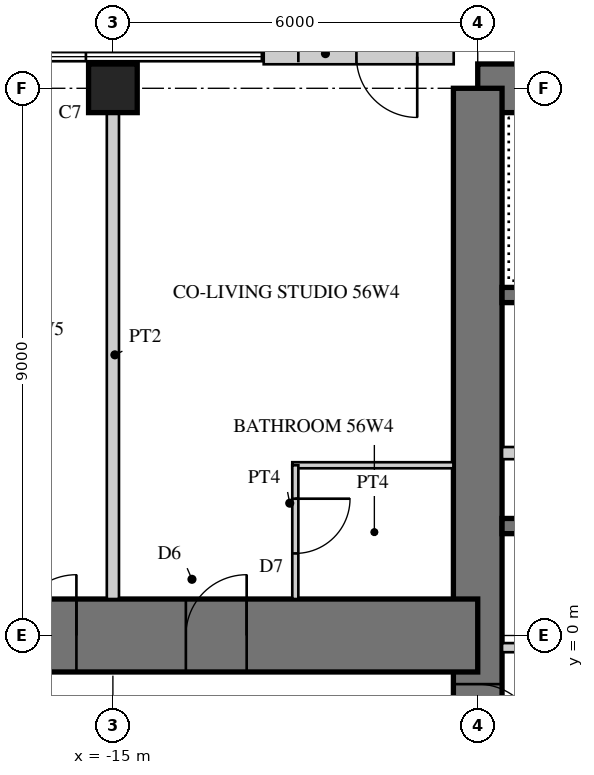
"""IFC4 building model, lengths in metres.
Left out: names, types, materials, properties, quantities, classifications, styles, units other than length and angle.
Written with IfcOpenShell. Run it as: python <this file> out.ifc"""

import sys

from ifc_helpers import new_model, si_unit, direction, frame, frame_2d, origin, origin_2d, place, context, subcontext, project, spatial, rectangle, hollow_rectangle, extrude, element, fill, save


model = new_model("IFC4")
c1 = context("Model", 3, precision=1e-05, world=origin(), true_north=direction((0.0, 1.0)))
c2 = subcontext(c1, "Body", "Model", "MODEL_VIEW")
j1 = project(units=[si_unit("LENGTHUNIT", "METRE"), si_unit("PLANEANGLEUNIT", "RADIAN")], contexts=[c1])
p1 = place(None, origin())
s1 = spatial("IfcSite", under=j1, at=p1, CompositionType="ELEMENT")
p2 = place(p1, origin())
s2 = spatial("IfcBuilding", under=s1, at=p2, CompositionType="ELEMENT")
p3 = place(p2, frame((0.0, 0.0, 222.1)))
s3 = spatial("IfcBuildingStorey", under=s2, at=p3, CompositionType="ELEMENT", Elevation=222.1)
p4 = place(p3, frame((9.0, 9.0, 0.0), z_axis=(0.0, 0.0, 1.0), x_axis=(-1.0, 0.0, 0.0)))
e1 = element("IfcWall", 1, at=p4, inside=s3, PredefinedType="SHEAR", context=c2, shape_type="SweptSolid", body=[
    extrude(rectangle(XDim=18.0, YDim=0.8, at=frame_2d((9.0, 0.0))), origin(), (0.0, 0.0, 1.0), 3.4),
])
p5 = place(p4, frame((9.8, 0.0, 0.0)))
e2 = element("IfcOpeningElement", 2, at=p5, cuts=e1, PredefinedType="OPENING", context=c2, shape_type="SweptSolid", body=[
    extrude(rectangle(XDim=1.0, YDim=2.4, at=frame_2d((0.5, 1.2))), frame((0.0, 0.41, 0.0), z_axis=(0.0, -1.0, 0.0), x_axis=(1.0, 0.0, 0.0)), (0.0, 0.0, 1.0), 0.82),
])
p6 = place(p3, frame((-9.0, 9.0, 0.0), z_axis=(0.0, 0.0, 1.0), x_axis=(0.0, -1.0, 0.0)))
e3 = element("IfcWall", 3, at=p6, inside=s3, PredefinedType="SHEAR", context=c2, shape_type="SweptSolid", body=[
    extrude(rectangle(XDim=18.0, YDim=0.8, at=frame_2d((9.0, 0.0))), origin(), (0.0, 0.0, 1.0), 3.4),
])
p7 = place(p6, frame((9.8, 0.0, 0.0)))
e4 = element("IfcOpeningElement", 4, at=p7, cuts=e3, PredefinedType="OPENING", context=c2, shape_type="SweptSolid", body=[
    extrude(rectangle(XDim=1.0, YDim=2.4, at=frame_2d((0.5, 1.2))), frame((0.0, 0.41, 0.0), z_axis=(0.0, -1.0, 0.0), x_axis=(1.0, 0.0, 0.0)), (0.0, 0.0, 1.0), 0.82),
])
p8 = place(p3, frame((-2.125, 1.8, 0.0), z_axis=(0.0, 0.0, 1.0), x_axis=(-1.0, 0.0, 0.0)))
e5 = element("IfcWall", 5, at=p8, inside=s3, PredefinedType="SHEAR", context=c2, shape_type="SweptSolid", body=[
    extrude(rectangle(XDim=6.475, YDim=0.25, at=frame_2d((3.238, 0.0))), origin(), (0.0, 0.0, 1.0), 3.4),
])
p9 = place(p3, frame((-2.125, 5.6, 0.0), z_axis=(0.0, 0.0, 1.0), x_axis=(-1.0, 0.0, 0.0)))
e6 = element("IfcWall", 6, at=p9, inside=s3, PredefinedType="SHEAR", context=c2, shape_type="SweptSolid", body=[
    extrude(rectangle(XDim=6.475, YDim=0.25, at=frame_2d((3.238, 0.0))), origin(), (0.0, 0.0, 1.0), 3.4),
])
p10 = place(p9, frame((0.175, 0.0, 0.0)))
e7 = element("IfcOpeningElement", 7, at=p10, cuts=e6, PredefinedType="OPENING", context=c2, shape_type="SweptSolid", body=[
    extrude(rectangle(XDim=1.0, YDim=2.1, at=frame_2d((0.5, 1.05))), frame((0.0, 0.135, 0.0), z_axis=(0.0, -1.0, 0.0), x_axis=(1.0, 0.0, 0.0)), (0.0, 0.0, 1.0), 0.27),
])
p11 = place(p3, frame((-5.725, 3.0, 0.0), z_axis=(0.0, 0.0, 1.0), x_axis=(-1.0, 0.0, 0.0)))
e8 = element("IfcWall", 8, at=p11, inside=s3, PredefinedType="PARTITIONING", context=c2, shape_type="SweptSolid", body=[
    extrude(rectangle(XDim=2.875, YDim=0.2, at=frame_2d((1.438, 0.0))), origin(), (0.0, 0.0, 1.0), 3.4),
])
p12 = place(p3, frame((-9.0, 0.0, 0.0), z_axis=(0.0, 0.0, 1.0), x_axis=(-1.0, 0.0, 0.0)))
e9 = element("IfcWall", 9, at=p12, inside=s3, PredefinedType="SHEAR", context=c2, shape_type="SweptSolid", body=[
    extrude(rectangle(XDim=18.0, YDim=1.2, at=frame_2d((9.0, 0.0))), origin(), (0.0, 0.0, 1.0), 3.4),
])
p13 = place(p12, frame((3.8, 0.0, 0.0)))
e10 = element("IfcOpeningElement", 10, at=p13, cuts=e9, PredefinedType="OPENING", context=c2, shape_type="SweptSolid", body=[
    extrude(rectangle(XDim=1.0, YDim=2.15, at=frame_2d((0.5, 1.075))), frame((0.0, 0.61, 0.0), z_axis=(0.0, -1.0, 0.0), x_axis=(1.0, 0.0, 0.0)), (0.0, 0.0, 1.0), 1.22),
])
p14 = place(p12, frame((6.6, 0.0, 0.0)))
e11 = element("IfcOpeningElement", 11, at=p14, cuts=e9, PredefinedType="OPENING", context=c2, shape_type="SweptSolid", body=[
    extrude(rectangle(XDim=1.0, YDim=2.15, at=frame_2d((0.5, 1.075))), frame((0.0, 0.61, 0.0), z_axis=(0.0, -1.0, 0.0), x_axis=(1.0, 0.0, 0.0)), (0.0, 0.0, 1.0), 1.22),
])
p15 = place(p12, frame((13.3, 0.0, 0.0)))
e12 = element("IfcOpeningElement", 12, at=p15, cuts=e9, PredefinedType="OPENING", context=c2, shape_type="SweptSolid", body=[
    extrude(rectangle(XDim=1.0, YDim=2.2, at=frame_2d((0.5, 1.1))), frame((0.0, 0.61, 0.0), z_axis=(0.0, -1.0, 0.0), x_axis=(1.0, 0.0, 0.0)), (0.0, 0.0, 1.0), 1.22),
])
p16 = place(p3, frame((-15.0, 9.0, 0.0), z_axis=(0.0, 0.0, 1.0), x_axis=(1.0, 0.0, 0.0)))
e13 = element("IfcColumn", 13, at=p16, inside=s3, PredefinedType="COLUMN", context=c2, shape_type="SweptSolid", body=[
    extrude(rectangle(XDim=0.8, YDim=0.8, at=origin_2d()), origin(), (0.0, 0.0, 1.0), 3.4),
])
p17 = place(p3, frame((-9.395, 9.52, 0.0), z_axis=(0.0, 0.0, 1.0), x_axis=(-1.0, 0.0, 0.0)))
e14 = element("IfcWall", 14, at=p17, inside=s3, PredefinedType="SOLIDWALL", context=c2, shape_type="SweptSolid", body=[
    extrude(rectangle(XDim=3.125, YDim=0.25, at=frame_2d((1.562, 0.0))), origin(), (0.0, 0.0, 1.0), 3.22),
])
p18 = place(p17, frame((0.6, 0.0, 0.0)))
e15 = element("IfcOpeningElement", 15, at=p18, cuts=e14, PredefinedType="OPENING", context=c2, shape_type="SweptSolid", body=[
    extrude(rectangle(XDim=1.0, YDim=2.2, at=frame_2d((0.5, 1.1))), frame((0.0, 0.135, 0.0), z_axis=(0.0, -1.0, 0.0), x_axis=(1.0, 0.0, 0.0)), (0.0, 0.0, 1.0), 0.27),
])
p19 = place(p3, frame((-2.325, -0.2, 0.0), z_axis=(0.0, 0.0, 1.0), x_axis=(-1.0, 0.0, 0.0)))
e16 = element("IfcWall", 16, at=p19, inside=s3, PredefinedType="PARTITIONING", context=c2, shape_type="SweptSolid", body=[
    extrude(rectangle(XDim=6.275, YDim=0.15, at=frame_2d((3.138, 0.0))), origin(), (0.0, 0.0, 1.0), 3.22),
])
p20 = place(p19, frame((0.4, 0.0, 0.0)))
e17 = element("IfcOpeningElement", 17, at=p20, cuts=e16, PredefinedType="OPENING", context=c2, shape_type="SweptSolid", body=[
    extrude(rectangle(XDim=1.0, YDim=2.1, at=frame_2d((0.5, 1.05))), frame((0.0, 0.085, 0.0), z_axis=(0.0, -1.0, 0.0), x_axis=(1.0, 0.0, 0.0)), (0.0, 0.0, 1.0), 0.17),
])
p21 = place(p3, frame((-9.4, 2.8, 0.0), z_axis=(0.0, 0.0, 1.0), x_axis=(-1.0, 0.0, 0.0)))
e18 = element("IfcWall", 18, at=p21, inside=s3, PredefinedType="PARTITIONING", context=c2, shape_type="SweptSolid", body=[
    extrude(rectangle(XDim=2.65, YDim=0.1, at=frame_2d((1.325, 0.0))), origin(), (0.0, 0.0, 1.0), 3.22),
])
p22 = place(p3, frame((-12.0, 2.8, 0.0), z_axis=(0.0, 0.0, 1.0), x_axis=(0.0, -1.0, 0.0)))
e19 = element("IfcWall", 19, at=p22, inside=s3, PredefinedType="PARTITIONING", context=c2, shape_type="SweptSolid", body=[
    extrude(rectangle(XDim=2.2, YDim=0.1, at=frame_2d((1.1, 0.0))), origin(), (0.0, 0.0, 1.0), 3.22),
])
p23 = place(p22, frame((0.55, 0.0, 0.0)))
e20 = element("IfcOpeningElement", 20, at=p23, cuts=e19, PredefinedType="OPENING", context=c2, shape_type="SweptSolid", body=[
    extrude(rectangle(XDim=0.9, YDim=2.1, at=frame_2d((0.45, 1.05))), frame((0.0, 0.06, 0.0), z_axis=(0.0, -1.0, 0.0), x_axis=(1.0, 0.0, 0.0)), (0.0, 0.0, 1.0), 0.12),
])
p24 = place(p3, frame((-15.0, 8.6, 0.0), z_axis=(0.0, 0.0, 1.0), x_axis=(0.0, -1.0, 0.0)))
e21 = element("IfcWall", 21, at=p24, inside=s3, PredefinedType="SOLIDWALL", context=c2, shape_type="SweptSolid", body=[
    extrude(rectangle(XDim=8.0, YDim=0.2, at=frame_2d((4.0, 0.0))), origin(), (0.0, 0.0, 1.0), 2.52),
])
p25 = place(p18, origin())
e22 = element("IfcDoor", 22, at=p25, inside=s3, OperationType="SINGLE_SWING_LEFT", PredefinedType="DOOR", context=c2, shape_type="SweptSolid", body=[
    extrude(hollow_rectangle(XDim=1.0, YDim=2.2, WallThickness=0.06, at=frame_2d((0.5, 1.1))), frame((0.0, 0.025, 0.0), z_axis=(0.0, -1.0, 0.0), x_axis=(1.0, 0.0, 0.0)), (0.0, 0.0, 1.0), 0.05),
    extrude(rectangle(XDim=0.879, YDim=2.079, at=frame_2d((0.5, 1.1))), frame((0.0, 0.025, 0.0), z_axis=(0.0, -1.0, 0.0), x_axis=(1.0, 0.0, 0.0)), (0.0, 0.0, 1.0), 0.05),
])
fill(e15, e22)
p26 = place(p23, origin())
e23 = element("IfcDoor", 23, at=p26, inside=s3, OperationType="SINGLE_SWING_LEFT", PredefinedType="DOOR", context=c2, shape_type="SweptSolid", body=[
    extrude(rectangle(XDim=0.9, YDim=2.1, at=frame_2d((0.45, 1.05))), frame((0.0, 0.025, 0.0), z_axis=(0.0, -1.0, 0.0), x_axis=(1.0, 0.0, 0.0)), (0.0, 0.0, 1.0), 0.05),
])
fill(e20, e23)
p27 = place(p13, frame((1.0, 0.0, 0.0), z_axis=(0.0, 0.0, 1.0), x_axis=(-1.0, 0.0, 0.0)))
e24 = element("IfcDoor", 24, at=p27, inside=s3, OperationType="SINGLE_SWING_RIGHT", PredefinedType="DOOR", context=c2, shape_type="SweptSolid", body=[
    extrude(rectangle(XDim=1.0, YDim=2.15, at=frame_2d((0.5, 1.075))), frame((0.0, 0.025, 0.0), z_axis=(0.0, -1.0, 0.0), x_axis=(1.0, 0.0, 0.0)), (0.0, 0.0, 1.0), 0.05),
])
fill(e10, e24)
p28 = place(p14, frame((1.0, 0.0, 0.0), z_axis=(0.0, 0.0, 1.0), x_axis=(-1.0, 0.0, 0.0)))
e25 = element("IfcDoor", 25, at=p28, inside=s3, OperationType="SINGLE_SWING_RIGHT", PredefinedType="DOOR", context=c2, shape_type="SweptSolid", body=[
    extrude(rectangle(XDim=1.0, YDim=2.15, at=frame_2d((0.5, 1.075))), frame((0.0, 0.025, 0.0), z_axis=(0.0, -1.0, 0.0), x_axis=(1.0, 0.0, 0.0)), (0.0, 0.0, 1.0), 0.05),
])
fill(e11, e25)
p29 = place(p7, origin())
e26 = element("IfcDoor", 26, at=p29, inside=s3, OperationType="SINGLE_SWING_RIGHT", PredefinedType="DOOR", context=c2, shape_type="SweptSolid", body=[
    extrude(rectangle(XDim=1.0, YDim=2.4, at=frame_2d((0.5, 1.2))), frame((0.0, 0.055, 0.0), z_axis=(0.0, -1.0, 0.0), x_axis=(1.0, 0.0, 0.0)), (0.0, 0.0, 1.0), 0.05),
])
fill(e4, e26)
save(model, sys.argv[1])
